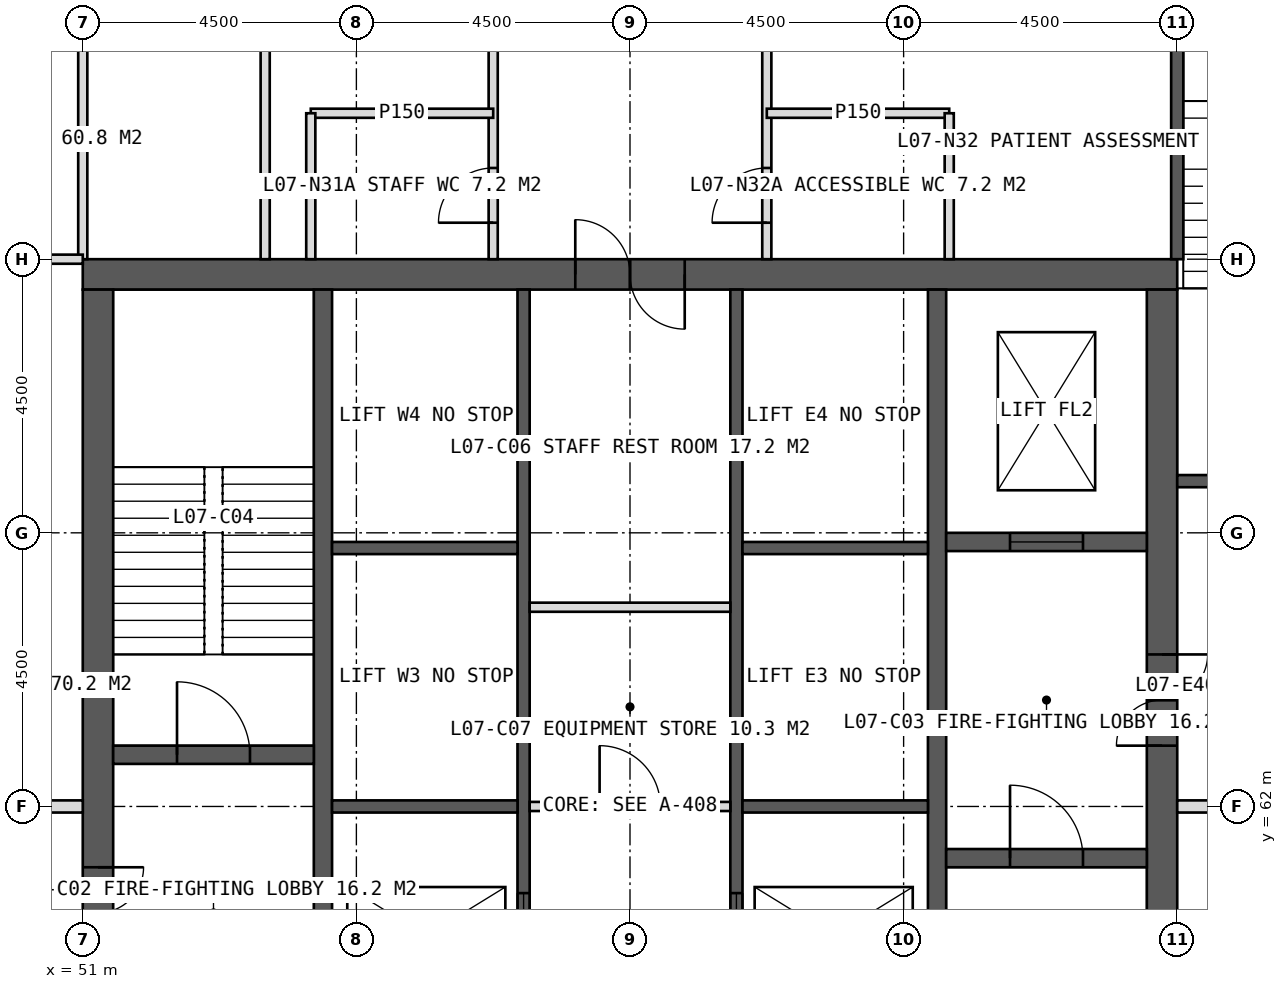
"""IFC4 building model, lengths in metres.
Left out: names, types, materials, properties, quantities, classifications, styles, units other than length and angle.
Written with IfcOpenShell. Run it as: python <this file> out.ifc"""

import sys

from ifc_helpers import new_model, si_unit, direction, frame, frame_2d, origin, place, context, subcontext, project, spatial, rectangle, extrude, element, fill, save


model = new_model("IFC4")
c1 = context("Model", 3, precision=1e-05, world=origin(), true_north=direction((0.0, 1.0)))
c2 = subcontext(c1, "Body", "Model", "MODEL_VIEW")
j1 = project(units=[si_unit("LENGTHUNIT", "METRE"), si_unit("PLANEANGLEUNIT", "RADIAN")], contexts=[c1])
p1 = place(None, origin())
s1 = spatial("IfcSite", under=j1, at=p1, CompositionType="ELEMENT")
p2 = place(p1, origin())
s2 = spatial("IfcBuilding", under=s1, at=p2, CompositionType="ELEMENT")
p3 = place(p2, frame((0.0, 0.0, 35.0)))
s3 = spatial("IfcBuildingStorey", under=s2, at=p3, CompositionType="ELEMENT", Elevation=35.0)
p4 = place(p3, frame((51.0, 70.75, 0.0), z_axis=(0.0, 0.0, 1.0), x_axis=(1.0, 0.0, 0.0)))
e1 = element("IfcWall", 1, at=p4, inside=s3, PredefinedType="SHEAR", context=c2, shape_type="SweptSolid", body=[
    extrude(rectangle(XDim=18.0, YDim=0.5, at=frame_2d((9.0, 0.0))), origin(), (0.0, 0.0, 1.0), 4.0),
])
p5 = place(p4, frame((8.1, 0.0, 0.0)))
e2 = element("IfcOpeningElement", 2, at=p5, cuts=e1, PredefinedType="OPENING", context=c2, shape_type="SweptSolid", body=[
    extrude(rectangle(XDim=1.8, YDim=2.2, at=frame_2d((0.9, 1.1))), frame((0.0, 0.26, 0.0), z_axis=(0.0, -1.0, 0.0), x_axis=(1.0, 0.0, 0.0)), (0.0, 0.0, 1.0), 0.52),
])
p6 = place(p3, frame((51.25, 53.5, 0.0), z_axis=(0.0, 0.0, 1.0), x_axis=(0.0, 1.0, 0.0)))
e3 = element("IfcWall", 3, at=p6, inside=s3, PredefinedType="SHEAR", context=c2, shape_type="SweptSolid", body=[
    extrude(rectangle(XDim=17.0, YDim=0.5, at=frame_2d((8.5, 0.0))), origin(), (0.0, 0.0, 1.0), 4.0),
])
p7 = place(p6, frame((6.0, 0.0, 0.0)))
e4 = element("IfcOpeningElement", 4, at=p7, cuts=e3, PredefinedType="OPENING", context=c2, shape_type="SweptSolid", body=[
    extrude(rectangle(XDim=1.5, YDim=2.2, at=frame_2d((0.75, 1.1))), frame((0.0, 0.26, 0.0), z_axis=(0.0, -1.0, 0.0), x_axis=(1.0, 0.0, 0.0)), (0.0, 0.0, 1.0), 0.52),
])
p8 = place(p3, frame((68.75, 53.5, 0.0), z_axis=(0.0, 0.0, 1.0), x_axis=(0.0, 1.0, 0.0)))
e5 = element("IfcWall", 5, at=p8, inside=s3, PredefinedType="SHEAR", context=c2, shape_type="SweptSolid", body=[
    extrude(rectangle(XDim=17.0, YDim=0.5, at=frame_2d((8.5, 0.0))), origin(), (0.0, 0.0, 1.0), 4.0),
])
p9 = place(p8, frame((9.5, 0.0, 0.0)))
e6 = element("IfcOpeningElement", 6, at=p9, cuts=e5, PredefinedType="OPENING", context=c2, shape_type="SweptSolid", body=[
    extrude(rectangle(XDim=1.5, YDim=2.2, at=frame_2d((0.75, 1.1))), frame((0.0, 0.26, 0.0), z_axis=(0.0, -1.0, 0.0), x_axis=(1.0, 0.0, 0.0)), (0.0, 0.0, 1.0), 0.52),
])
for number, where, z_axis, x_axis in (
    (7, (54.95, 53.5, 0.0), (0.0, 0.0, 1.0), (0.0, 1.0, 0.0)),
    (8, (65.05, 53.5, 0.0), (0.0, 0.0, 1.0), (0.0, 1.0, 0.0)),
):
    element("IfcWall", number, at=place(p3, frame(where, z_axis=z_axis, x_axis=x_axis)), inside=s3, PredefinedType="SHEAR", context=c2, shape_type="SweptSolid", body=[
        extrude(rectangle(XDim=17.0, YDim=0.3, at=frame_2d((8.5, 0.0))), origin(), (0.0, 0.0, 1.0), 4.0),
    ])
p10 = place(p3, frame((58.25, 53.5, 0.0), z_axis=(0.0, 0.0, 1.0), x_axis=(0.0, 1.0, 0.0)))
e9 = element("IfcWall", 9, at=p10, inside=s3, PredefinedType="SHEAR", context=c2, shape_type="SweptSolid", body=[
    extrude(rectangle(XDim=17.0, YDim=0.2, at=frame_2d((8.5, 0.0))), origin(), (0.0, 0.0, 1.0), 4.0),
])
p11 = place(p10, frame((1.375, 0.0, 0.0)))
e10 = element("IfcOpeningElement", 10, at=p11, cuts=e9, PredefinedType="OPENING", context=c2, shape_type="SweptSolid", body=[
    extrude(rectangle(XDim=1.4, YDim=2.2, at=frame_2d((0.7, 1.1))), frame((0.0, 0.11, 0.0), z_axis=(0.0, -1.0, 0.0), x_axis=(1.0, 0.0, 0.0)), (0.0, 0.0, 1.0), 0.22),
])
p12 = place(p10, frame((5.675, 0.0, 0.0)))
e11 = element("IfcOpeningElement", 11, at=p12, cuts=e9, PredefinedType="OPENING", context=c2, shape_type="SweptSolid", body=[
    extrude(rectangle(XDim=1.4, YDim=2.2, at=frame_2d((0.7, 1.1))), frame((0.0, 0.11, 0.0), z_axis=(0.0, -1.0, 0.0), x_axis=(1.0, 0.0, 0.0)), (0.0, 0.0, 1.0), 0.22),
])
p13 = place(p3, frame((61.75, 53.5, 0.0), z_axis=(0.0, 0.0, 1.0), x_axis=(0.0, 1.0, 0.0)))
e12 = element("IfcWall", 12, at=p13, inside=s3, PredefinedType="SHEAR", context=c2, shape_type="SweptSolid", body=[
    extrude(rectangle(XDim=17.0, YDim=0.2, at=frame_2d((8.5, 0.0))), origin(), (0.0, 0.0, 1.0), 4.0),
])
p14 = place(p13, frame((1.375, 0.0, 0.0)))
e13 = element("IfcOpeningElement", 13, at=p14, cuts=e12, PredefinedType="OPENING", context=c2, shape_type="SweptSolid", body=[
    extrude(rectangle(XDim=1.4, YDim=2.2, at=frame_2d((0.7, 1.1))), frame((0.0, 0.11, 0.0), z_axis=(0.0, -1.0, 0.0), x_axis=(1.0, 0.0, 0.0)), (0.0, 0.0, 1.0), 0.22),
])
p15 = place(p13, frame((5.675, 0.0, 0.0)))
e14 = element("IfcOpeningElement", 14, at=p15, cuts=e12, PredefinedType="OPENING", context=c2, shape_type="SweptSolid", body=[
    extrude(rectangle(XDim=1.4, YDim=2.2, at=frame_2d((0.7, 1.1))), frame((0.0, 0.11, 0.0), z_axis=(0.0, -1.0, 0.0), x_axis=(1.0, 0.0, 0.0)), (0.0, 0.0, 1.0), 0.22),
])
for number, where, z_axis, x_axis in (
    (15, (55.1, 62.0, 0.0), (0.0, 0.0, 1.0), (1.0, 0.0, 0.0)),
    (16, (61.85, 62.0, 0.0), (0.0, 0.0, 1.0), (1.0, 0.0, 0.0)),
    (17, (55.1, 66.25, 0.0), (0.0, 0.0, 1.0), (1.0, 0.0, 0.0)),
    (18, (61.85, 66.25, 0.0), (0.0, 0.0, 1.0), (1.0, 0.0, 0.0)),
):
    element("IfcWall", number, at=place(p3, frame(where, z_axis=z_axis, x_axis=x_axis)), inside=s3, PredefinedType="SHEAR", context=c2, shape_type="SweptSolid", body=[
        extrude(rectangle(XDim=3.05, YDim=0.2, at=frame_2d((1.525, 0.0))), origin(), (0.0, 0.0, 1.0), 4.0),
    ])
p16 = place(p3, frame((51.5, 62.85, 0.0), z_axis=(0.0, 0.0, 1.0), x_axis=(1.0, 0.0, 0.0)))
e19 = element("IfcWall", 19, at=p16, inside=s3, PredefinedType="SHEAR", context=c2, shape_type="SweptSolid", body=[
    extrude(rectangle(XDim=3.3, YDim=0.3, at=frame_2d((1.65, 0.0))), origin(), (0.0, 0.0, 1.0), 4.0),
])
p17 = place(p16, frame((1.05, 0.0, 0.0)))
e20 = element("IfcOpeningElement", 20, at=p17, cuts=e19, PredefinedType="OPENING", context=c2, shape_type="SweptSolid", body=[
    extrude(rectangle(XDim=1.2, YDim=2.1, at=frame_2d((0.6, 1.05))), frame((0.0, 0.16, 0.0), z_axis=(0.0, -1.0, 0.0), x_axis=(1.0, 0.0, 0.0)), (0.0, 0.0, 1.0), 0.32),
])
p18 = place(p3, frame((65.2, 61.15, 0.0), z_axis=(0.0, 0.0, 1.0), x_axis=(1.0, 0.0, 0.0)))
e21 = element("IfcWall", 21, at=p18, inside=s3, PredefinedType="SHEAR", context=c2, shape_type="SweptSolid", body=[
    extrude(rectangle(XDim=3.3, YDim=0.3, at=frame_2d((1.65, 0.0))), origin(), (0.0, 0.0, 1.0), 4.0),
])
p19 = place(p18, frame((1.05, 0.0, 0.0)))
e22 = element("IfcOpeningElement", 22, at=p19, cuts=e21, PredefinedType="OPENING", context=c2, shape_type="SweptSolid", body=[
    extrude(rectangle(XDim=1.2, YDim=2.1, at=frame_2d((0.6, 1.05))), frame((0.0, 0.16, 0.0), z_axis=(0.0, -1.0, 0.0), x_axis=(1.0, 0.0, 0.0)), (0.0, 0.0, 1.0), 0.32),
])
p20 = place(p3, frame((65.2, 66.35, 0.0), z_axis=(0.0, 0.0, 1.0), x_axis=(1.0, 0.0, 0.0)))
e23 = element("IfcWall", 23, at=p20, inside=s3, PredefinedType="SHEAR", context=c2, shape_type="SweptSolid", body=[
    extrude(rectangle(XDim=3.3, YDim=0.3, at=frame_2d((1.65, 0.0))), origin(), (0.0, 0.0, 1.0), 4.0),
])
p21 = place(p20, frame((1.05, 0.0, 0.0)))
e24 = element("IfcOpeningElement", 24, at=p21, cuts=e23, PredefinedType="OPENING", context=c2, shape_type="SweptSolid", body=[
    extrude(rectangle(XDim=1.2, YDim=2.2, at=frame_2d((0.6, 1.1))), frame((0.0, 0.16, 0.0), z_axis=(0.0, -1.0, 0.0), x_axis=(1.0, 0.0, 0.0)), (0.0, 0.0, 1.0), 0.32),
])
p22 = place(p3, frame((51.0, 71.0, 0.0), z_axis=(0.0, 0.0, 1.0), x_axis=(0.0, 1.0, 0.0)))
e25 = element("IfcWall", 25, at=p22, inside=s3, PredefinedType="PARTITIONING", context=c2, shape_type="SweptSolid", body=[
    extrude(rectangle(XDim=7.8, YDim=0.15, at=frame_2d((3.9, 0.0))), origin(), (0.0, 0.0, 1.0), 3.75),
])
p23 = place(p3, frame((57.75, 71.0, 0.0), z_axis=(0.0, 0.0, 1.0), x_axis=(0.0, 1.0, 0.0)))
e26 = element("IfcWall", 26, at=p23, inside=s3, PredefinedType="PARTITIONING", context=c2, shape_type="SweptSolid", body=[
    extrude(rectangle(XDim=7.8, YDim=0.15, at=frame_2d((3.9, 0.0))), origin(), (0.0, 0.0, 1.0), 3.75),
])
p24 = place(p23, frame((0.6, 0.0, 0.0)))
e27 = element("IfcOpeningElement", 27, at=p24, cuts=e26, PredefinedType="OPENING", context=c2, shape_type="SweptSolid", body=[
    extrude(rectangle(XDim=0.9, YDim=2.1, at=frame_2d((0.45, 1.05))), frame((0.0, 0.085, 0.0), z_axis=(0.0, -1.0, 0.0), x_axis=(1.0, 0.0, 0.0)), (0.0, 0.0, 1.0), 0.17),
])
p25 = place(p3, frame((62.25, 71.0, 0.0), z_axis=(0.0, 0.0, 1.0), x_axis=(0.0, 1.0, 0.0)))
e28 = element("IfcWall", 28, at=p25, inside=s3, PredefinedType="PARTITIONING", context=c2, shape_type="SweptSolid", body=[
    extrude(rectangle(XDim=7.8, YDim=0.15, at=frame_2d((3.9, 0.0))), origin(), (0.0, 0.0, 1.0), 3.75),
])
p26 = place(p25, frame((0.6, 0.0, 0.0)))
e29 = element("IfcOpeningElement", 29, at=p26, cuts=e28, PredefinedType="OPENING", context=c2, shape_type="SweptSolid", body=[
    extrude(rectangle(XDim=0.9, YDim=2.1, at=frame_2d((0.45, 1.05))), frame((0.0, 0.085, 0.0), z_axis=(0.0, -1.0, 0.0), x_axis=(1.0, 0.0, 0.0)), (0.0, 0.0, 1.0), 0.17),
])
p27 = place(p3, frame((54.0, 71.0, 0.0), z_axis=(0.0, 0.0, 1.0), x_axis=(0.0, 1.0, 0.0)))
e30 = element("IfcWall", 30, at=p27, inside=s3, PredefinedType="PARTITIONING", context=c2, shape_type="SweptSolid", body=[
    extrude(rectangle(XDim=7.8, YDim=0.15, at=frame_2d((3.9, 0.0))), origin(), (0.0, 0.0, 1.0), 3.75),
])
p28 = place(p3, frame((54.75, 73.4, 0.0), z_axis=(0.0, 0.0, 1.0), x_axis=(1.0, 0.0, 0.0)))
e31 = element("IfcWall", 31, at=p28, inside=s3, PredefinedType="PARTITIONING", context=c2, shape_type="SweptSolid", body=[
    extrude(rectangle(XDim=3.0, YDim=0.15, at=frame_2d((1.5, 0.0))), origin(), (0.0, 0.0, 1.0), 3.75),
])
p29 = place(p3, frame((54.75, 71.0, 0.0), z_axis=(0.0, 0.0, 1.0), x_axis=(0.0, 1.0, 0.0)))
e32 = element("IfcWall", 32, at=p29, inside=s3, PredefinedType="PARTITIONING", context=c2, shape_type="SweptSolid", body=[
    extrude(rectangle(XDim=2.4, YDim=0.15, at=frame_2d((1.2, 0.0))), origin(), (0.0, 0.0, 1.0), 3.75),
])
p30 = place(p3, frame((62.25, 73.4, 0.0), z_axis=(0.0, 0.0, 1.0), x_axis=(1.0, 0.0, 0.0)))
e33 = element("IfcWall", 33, at=p30, inside=s3, PredefinedType="PARTITIONING", context=c2, shape_type="SweptSolid", body=[
    extrude(rectangle(XDim=3.0, YDim=0.15, at=frame_2d((1.5, 0.0))), origin(), (0.0, 0.0, 1.0), 3.75),
])
p31 = place(p3, frame((65.25, 71.0, 0.0), z_axis=(0.0, 0.0, 1.0), x_axis=(0.0, 1.0, 0.0)))
e34 = element("IfcWall", 34, at=p31, inside=s3, PredefinedType="PARTITIONING", context=c2, shape_type="SweptSolid", body=[
    extrude(rectangle(XDim=2.4, YDim=0.15, at=frame_2d((1.2, 0.0))), origin(), (0.0, 0.0, 1.0), 3.75),
])
p32 = place(p3, frame((51.0, 62.0, 0.0), z_axis=(0.0, 0.0, 1.0), x_axis=(-1.0, 0.0, 0.0)))
e35 = element("IfcWall", 35, at=p32, inside=s3, PredefinedType="SOLIDWALL", context=c2, shape_type="SweptSolid", body=[
    extrude(rectangle(XDim=7.8, YDim=0.2, at=frame_2d((3.9, 0.0))), origin(), (0.0, 0.0, 1.0), 2.75),
])
p33 = place(p3, frame((51.0, 71.0, 0.0), z_axis=(0.0, 0.0, 1.0), x_axis=(-1.0, 0.0, 0.0)))
e36 = element("IfcWall", 36, at=p33, inside=s3, PredefinedType="PARTITIONING", context=c2, shape_type="SweptSolid", body=[
    extrude(rectangle(XDim=7.8, YDim=0.15, at=frame_2d((3.9, 0.0))), origin(), (0.0, 0.0, 1.0), 3.75),
])
p34 = place(p3, frame((69.0, 62.0, 0.0), z_axis=(0.0, 0.0, 1.0), x_axis=(1.0, 0.0, 0.0)))
e37 = element("IfcWall", 37, at=p34, inside=s3, PredefinedType="SOLIDWALL", context=c2, shape_type="SweptSolid", body=[
    extrude(rectangle(XDim=7.8, YDim=0.2, at=frame_2d((3.9, 0.0))), origin(), (0.0, 0.0, 1.0), 2.75),
])
p35 = place(p3, frame((58.35, 62.0, 0.0), z_axis=(0.0, 0.0, 1.0), x_axis=(1.0, 0.0, 0.0)))
e38 = element("IfcWall", 38, at=p35, inside=s3, PredefinedType="PARTITIONING", context=c2, shape_type="SweptSolid", body=[
    extrude(rectangle(XDim=3.3, YDim=0.15, at=frame_2d((1.65, 0.0))), origin(), (0.0, 0.0, 1.0), 3.75),
])
p36 = place(p35, frame((1.15, 0.0, 0.0)))
e39 = element("IfcOpeningElement", 39, at=p36, cuts=e38, PredefinedType="OPENING", context=c2, shape_type="SweptSolid", body=[
    extrude(rectangle(XDim=1.0, YDim=2.1, at=frame_2d((0.5, 1.05))), frame((0.0, 0.085, 0.0), z_axis=(0.0, -1.0, 0.0), x_axis=(1.0, 0.0, 0.0)), (0.0, 0.0, 1.0), 0.17),
])
p37 = place(p3, frame((58.35, 65.277, 0.0), z_axis=(0.0, 0.0, 1.0), x_axis=(1.0, 0.0, 0.0)))
e40 = element("IfcWall", 40, at=p37, inside=s3, PredefinedType="PARTITIONING", context=c2, shape_type="SweptSolid", body=[
    extrude(rectangle(XDim=3.3, YDim=0.15, at=frame_2d((1.65, 0.0))), origin(), (0.0, 0.0, 1.0), 3.75),
])
p38 = place(p3, frame((69.0, 71.0, 0.0), z_axis=(0.0, 0.0, 1.0), x_axis=(0.0, 1.0, 0.0)))
e41 = element("IfcWall", 41, at=p38, inside=s3, PredefinedType="SOLIDWALL", context=c2, shape_type="SweptSolid", body=[
    extrude(rectangle(XDim=4.1, YDim=0.2, at=frame_2d((2.05, 0.0))), origin(), (0.0, 0.0, 1.0), 3.75),
])
p39 = place(p3, frame((69.0, 67.35, 0.0), z_axis=(0.0, 0.0, 1.0), x_axis=(1.0, 0.0, 0.0)))
e42 = element("IfcWall", 42, at=p39, inside=s3, PredefinedType="SOLIDWALL", context=c2, shape_type="SweptSolid", body=[
    extrude(rectangle(XDim=3.5, YDim=0.2, at=frame_2d((1.75, 0.0))), origin(), (0.0, 0.0, 1.0), 3.75),
])
p40 = place(p24, origin())
e43 = element("IfcDoor", 43, at=p40, inside=s3, OperationType="SINGLE_SWING_LEFT", PredefinedType="DOOR", context=c2, shape_type="SweptSolid", body=[
    extrude(rectangle(XDim=0.9, YDim=2.1, at=frame_2d((0.45, 1.05))), frame((0.0, 0.025, 0.0), z_axis=(0.0, -1.0, 0.0), x_axis=(1.0, 0.0, 0.0)), (0.0, 0.0, 1.0), 0.05),
])
fill(e27, e43)
p41 = place(p26, origin())
e44 = element("IfcDoor", 44, at=p41, inside=s3, OperationType="SINGLE_SWING_LEFT", PredefinedType="DOOR", context=c2, shape_type="SweptSolid", body=[
    extrude(rectangle(XDim=0.9, YDim=2.1, at=frame_2d((0.45, 1.05))), frame((0.0, 0.025, 0.0), z_axis=(0.0, -1.0, 0.0), x_axis=(1.0, 0.0, 0.0)), (0.0, 0.0, 1.0), 0.05),
])
fill(e29, e44)
p42 = place(p7, origin())
e45 = element("IfcDoor", 45, at=p42, inside=s3, OperationType="DOUBLE_DOOR_SINGLE_SWING", PredefinedType="DOOR", context=c2, shape_type="SweptSolid", body=[
    extrude(rectangle(XDim=1.5, YDim=2.2, at=frame_2d((0.75, 1.1))), frame((0.0, 0.025, 0.0), z_axis=(0.0, -1.0, 0.0), x_axis=(1.0, 0.0, 0.0)), (0.0, 0.0, 1.0), 0.05),
])
fill(e4, e45)
p43 = place(p9, origin())
e46 = element("IfcDoor", 46, at=p43, inside=s3, OperationType="DOUBLE_DOOR_SINGLE_SWING", PredefinedType="DOOR", context=c2, shape_type="SweptSolid", body=[
    extrude(rectangle(XDim=1.5, YDim=2.2, at=frame_2d((0.75, 1.1))), frame((0.0, 0.025, 0.0), z_axis=(0.0, -1.0, 0.0), x_axis=(1.0, 0.0, 0.0)), (0.0, 0.0, 1.0), 0.05),
])
fill(e6, e46)
p44 = place(p17, origin())
e47 = element("IfcDoor", 47, at=p44, inside=s3, OperationType="SINGLE_SWING_LEFT", PredefinedType="DOOR", context=c2, shape_type="SweptSolid", body=[
    extrude(rectangle(XDim=1.2, YDim=2.1, at=frame_2d((0.6, 1.05))), frame((0.0, 0.025, 0.0), z_axis=(0.0, -1.0, 0.0), x_axis=(1.0, 0.0, 0.0)), (0.0, 0.0, 1.0), 0.05),
])
fill(e20, e47)
p45 = place(p19, origin())
e48 = element("IfcDoor", 48, at=p45, inside=s3, OperationType="SINGLE_SWING_LEFT", PredefinedType="DOOR", context=c2, shape_type="SweptSolid", body=[
    extrude(rectangle(XDim=1.2, YDim=2.1, at=frame_2d((0.6, 1.05))), frame((0.0, 0.025, 0.0), z_axis=(0.0, -1.0, 0.0), x_axis=(1.0, 0.0, 0.0)), (0.0, 0.0, 1.0), 0.05),
])
fill(e22, e48)
p46 = place(p21, origin())
e49 = element("IfcDoor", 49, at=p46, inside=s3, OperationType="SLIDING_TO_LEFT", PredefinedType="DOOR", context=c2, shape_type="SweptSolid", body=[
    extrude(rectangle(XDim=1.2, YDim=2.2, at=frame_2d((0.6, 1.1))), frame((0.0, 0.025, 0.0), z_axis=(0.0, -1.0, 0.0), x_axis=(1.0, 0.0, 0.0)), (0.0, 0.0, 1.0), 0.05),
])
fill(e24, e49)
p47 = place(p12, origin())
e50 = element("IfcDoor", 50, at=p47, inside=s3, OperationType="SLIDING_TO_LEFT", PredefinedType="DOOR", context=c2, shape_type="SweptSolid", body=[
    extrude(rectangle(XDim=1.4, YDim=2.2, at=frame_2d((0.7, 1.1))), frame((0.0, 0.025, 0.0), z_axis=(0.0, -1.0, 0.0), x_axis=(1.0, 0.0, 0.0)), (0.0, 0.0, 1.0), 0.05),
])
fill(e11, e50)
p48 = place(p15, origin())
e51 = element("IfcDoor", 51, at=p48, inside=s3, OperationType="SLIDING_TO_LEFT", PredefinedType="DOOR", context=c2, shape_type="SweptSolid", body=[
    extrude(rectangle(XDim=1.4, YDim=2.2, at=frame_2d((0.7, 1.1))), frame((0.0, 0.025, 0.0), z_axis=(0.0, -1.0, 0.0), x_axis=(1.0, 0.0, 0.0)), (0.0, 0.0, 1.0), 0.05),
])
fill(e14, e51)
p49 = place(p36, origin())
e52 = element("IfcDoor", 52, at=p49, inside=s3, OperationType="SINGLE_SWING_LEFT", PredefinedType="DOOR", context=c2, shape_type="SweptSolid", body=[
    extrude(rectangle(XDim=1.0, YDim=2.1, at=frame_2d((0.5, 1.05))), frame((0.0, 0.025, 0.0), z_axis=(0.0, -1.0, 0.0), x_axis=(1.0, 0.0, 0.0)), (0.0, 0.0, 1.0), 0.05),
])
fill(e39, e52)
p50 = place(p5, origin())
e53 = element("IfcDoor", 53, at=p50, inside=s3, OperationType="DOUBLE_DOOR_SINGLE_SWING", PredefinedType="DOOR", context=c2, shape_type="SweptSolid", body=[
    extrude(rectangle(XDim=1.8, YDim=2.2, at=frame_2d((0.9, 1.1))), frame((0.0, 0.025, 0.0), z_axis=(0.0, -1.0, 0.0), x_axis=(1.0, 0.0, 0.0)), (0.0, 0.0, 1.0), 0.05),
])
fill(e2, e53)
save(model, sys.argv[1])
